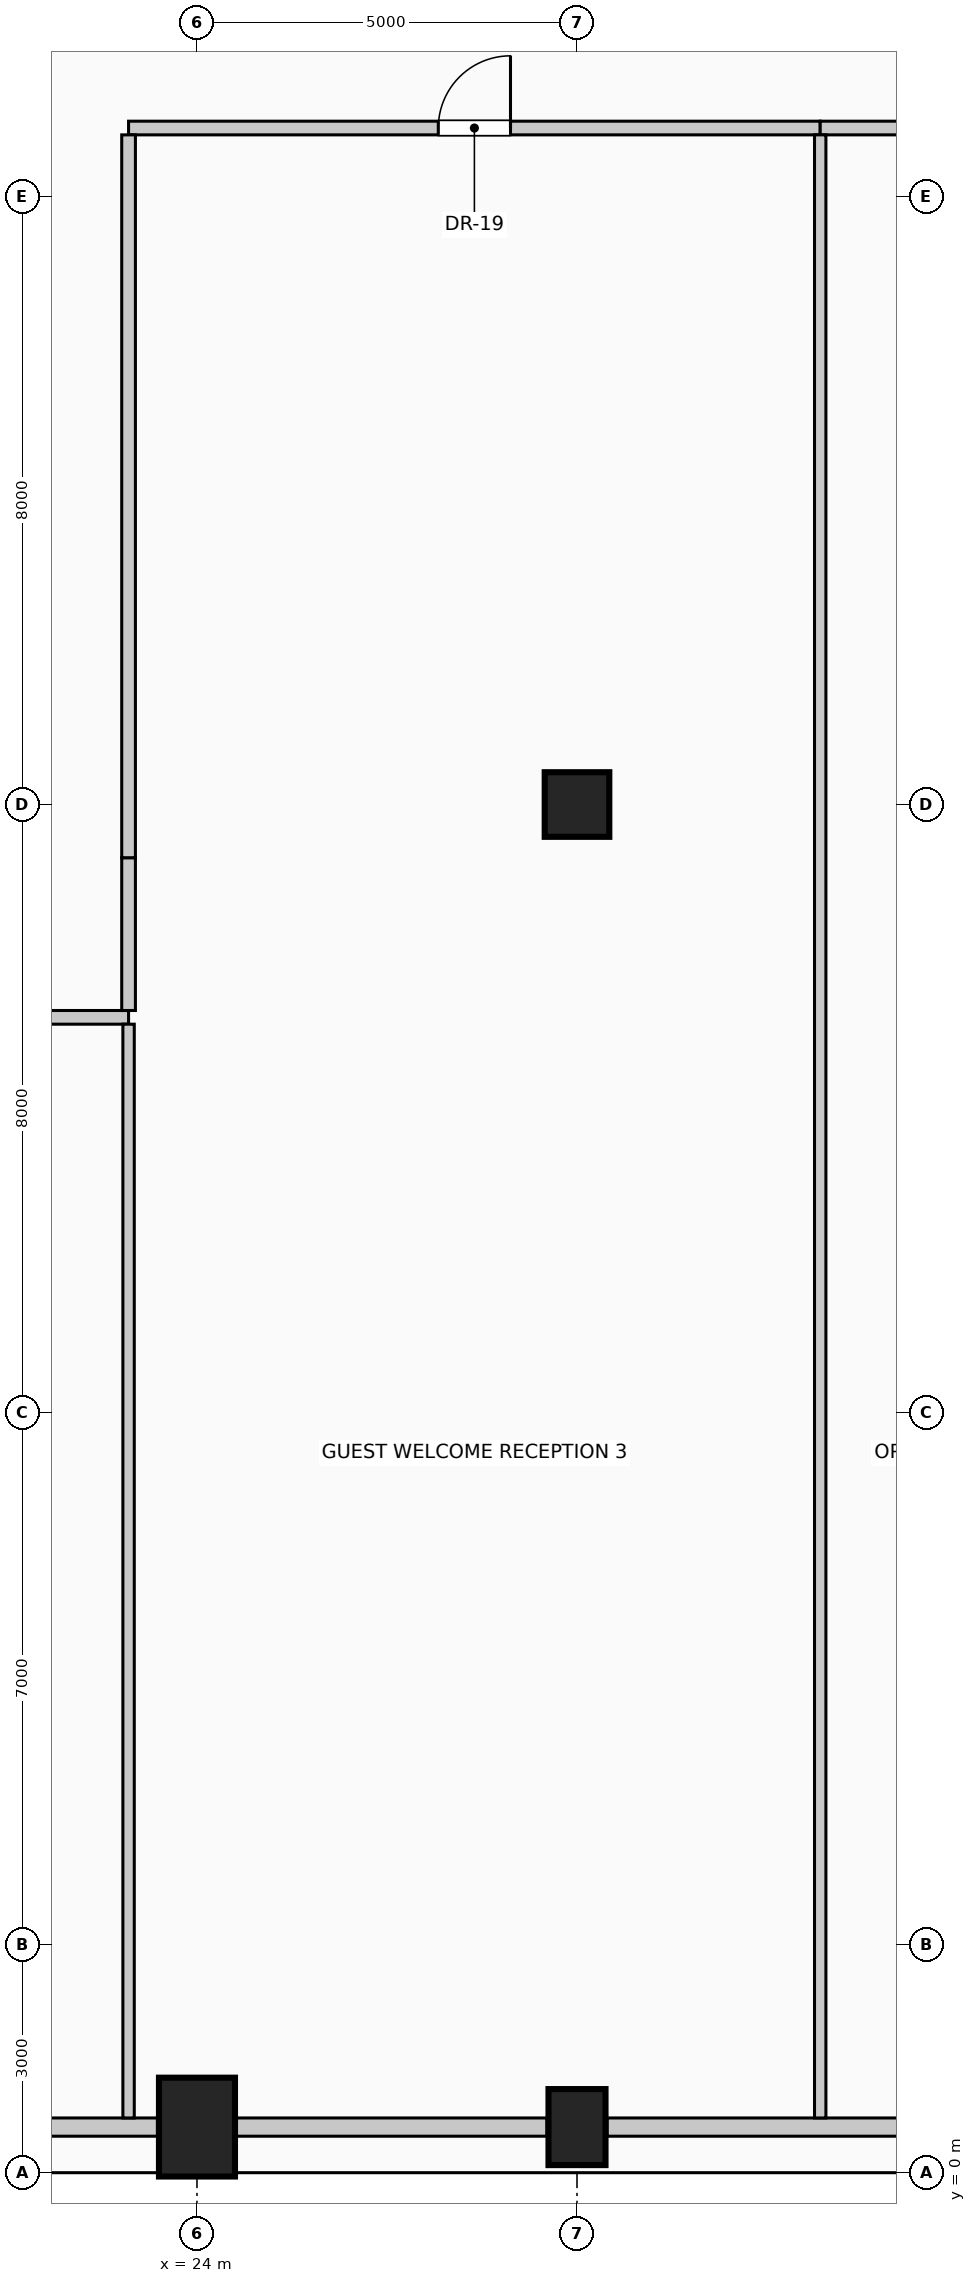
"""IFC4 building model, lengths in metres.
Left out: names, types, materials, properties, quantities, classifications, styles, units other than length and angle.
Written with IfcOpenShell. Run it as: python <this file> out.ifc"""

import sys

from ifc_helpers import new_model, si_unit, direction, frame, frame_2d, origin, origin_2d, place, context, subcontext, project, spatial, rectangle, circle, extrude, element, fill, save


model = new_model("IFC4")
c1 = context("Model", 3, precision=1e-05, world=origin(), true_north=direction((0.0, 1.0)))
c2 = subcontext(c1, "Body", "Model", "MODEL_VIEW")
j1 = project(units=[si_unit("LENGTHUNIT", "METRE"), si_unit("PLANEANGLEUNIT", "RADIAN")], contexts=[c1])
p1 = place(None, origin())
s1 = spatial("IfcSite", under=j1, at=p1, CompositionType="ELEMENT")
p2 = place(p1, origin())
s2 = spatial("IfcBuilding", under=s1, at=p2, CompositionType="ELEMENT")
p3 = place(p2, frame((0.0, 0.0, 222.6)))
s3 = spatial("IfcBuildingStorey", under=s2, at=p3, CompositionType="ELEMENT", Elevation=222.6)
p4 = place(p3, frame((24.0, 0.6, 0.0), z_axis=(0.0, 0.0, 1.0), x_axis=(1.0, 0.0, 0.0)))
e1 = element("IfcColumn", 1, at=p4, inside=s3, PredefinedType="COLUMN", context=c2, shape_type="SweptSolid", body=[
    extrude(rectangle(XDim=1.0, YDim=1.3, at=origin_2d()), origin(), (0.0, 0.0, 1.0), 4.0),
])
p5 = place(p3, frame((29.0, 0.6, 0.0), z_axis=(0.0, 0.0, 1.0), x_axis=(1.0, 0.0, 0.0)))
e2 = element("IfcColumn", 2, at=p5, inside=s3, PredefinedType="COLUMN", context=c2, shape_type="SweptSolid", body=[
    extrude(rectangle(XDim=0.75, YDim=1.0, at=origin_2d()), origin(), (0.0, 0.0, 1.0), 4.0),
])
p6 = place(p3, frame((29.0, 18.0, 0.0), z_axis=(0.0, 0.0, 1.0), x_axis=(1.0, 0.0, 0.0)))
e3 = element("IfcColumn", 3, at=p6, inside=s3, PredefinedType="COLUMN", context=c2, shape_type="SweptSolid", body=[
    extrude(circle(Radius=0.425, at=origin_2d()), origin(), (0.0, 0.0, 1.0), 4.0),
])
p7 = place(p3, frame((23.48, 0.6, 0.0), z_axis=(0.0, 0.0, 1.0), x_axis=(-1.0, 0.0, 0.0)))
e4 = element("IfcWall", 4, at=p7, inside=s3, PredefinedType="SOLIDWALL", context=c2, shape_type="SweptSolid", body=[
    extrude(rectangle(XDim=6.56, YDim=0.24, at=frame_2d((3.28, 0.0))), origin(), (0.0, 0.0, 1.0), 3.0),
])
p8 = place(p7, frame((3.773, 0.0, 0.42)))
e5 = element("IfcOpeningElement", 5, at=p8, cuts=e4, PredefinedType="OPENING", context=c2, shape_type="SweptSolid", body=[
    extrude(rectangle(XDim=1.8, YDim=2.2, at=frame_2d((0.9, 1.1))), frame((0.0, 0.13, 0.0), z_axis=(0.0, -1.0, 0.0), x_axis=(1.0, 0.0, 0.0)), (0.0, 0.0, 1.0), 0.26),
])
for number, where, z_axis, x_axis in (
    (6, (28.605, 0.6, 0.0), (0.0, 0.0, 1.0), (-1.0, 0.0, 0.0)),
    (7, (33.48, 0.6, 0.0), (0.0, 0.0, 1.0), (-1.0, 0.0, 0.0)),
):
    element("IfcWall", number, at=place(p3, frame(where, z_axis=z_axis, x_axis=x_axis)), inside=s3, PredefinedType="SOLIDWALL", context=c2, shape_type="SweptSolid", body=[
        extrude(rectangle(XDim=4.085, YDim=0.24, at=frame_2d((2.042, 0.0))), origin(), (0.0, 0.0, 1.0), 3.0),
    ])
p9 = place(p3, frame((8.5, 15.2, 0.0), z_axis=(0.0, 0.0, 1.0), x_axis=(1.0, 0.0, 0.0)))
e8 = element("IfcWall", 8, at=p9, inside=s3, PredefinedType="PARTITIONING", context=c2, shape_type="SweptSolid", body=[
    extrude(rectangle(XDim=14.6, YDim=0.18, at=frame_2d((7.3, 0.0))), origin(), (0.0, 0.0, 1.0), 3.75),
])
p10 = place(p9, frame((6.775, 0.0, 0.0)))
e9 = element("IfcOpeningElement", 9, at=p10, cuts=e8, PredefinedType="OPENING", context=c2, shape_type="SweptSolid", body=[
    extrude(rectangle(XDim=1.05, YDim=2.15, at=frame_2d((0.525, 1.075))), frame((0.0, 0.1, 0.0), z_axis=(0.0, -1.0, 0.0), x_axis=(1.0, 0.0, 0.0)), (0.0, 0.0, 1.0), 0.2),
])
p11 = place(p3, frame((23.1, 26.9, 0.0), z_axis=(0.0, 0.0, 1.0), x_axis=(1.0, 0.0, 0.0)))
e10 = element("IfcWall", 10, at=p11, inside=s3, PredefinedType="PARTITIONING", context=c2, shape_type="SweptSolid", body=[
    extrude(rectangle(XDim=9.1, YDim=0.18, at=frame_2d((4.55, 0.0))), origin(), (0.0, 0.0, 1.0), 3.75),
])
p12 = place(p11, frame((4.075, 0.0, 0.0)))
e11 = element("IfcOpeningElement", 11, at=p12, cuts=e10, PredefinedType="OPENING", context=c2, shape_type="SweptSolid", body=[
    extrude(rectangle(XDim=0.95, YDim=2.15, at=frame_2d((0.475, 1.075))), frame((0.0, 0.1, 0.0), z_axis=(0.0, -1.0, 0.0), x_axis=(1.0, 0.0, 0.0)), (0.0, 0.0, 1.0), 0.2),
])
p13 = place(p3, frame((32.2, 26.9, 0.0), z_axis=(0.0, 0.0, 1.0), x_axis=(1.0, 0.0, 0.0)))
e12 = element("IfcWall", 12, at=p13, inside=s3, PredefinedType="PARTITIONING", context=c2, shape_type="SweptSolid", body=[
    extrude(rectangle(XDim=5.7, YDim=0.18, at=frame_2d((2.85, 0.0))), origin(), (0.0, 0.0, 1.0), 3.75),
])
p14 = place(p13, frame((2.325, 0.0, 0.0)))
e13 = element("IfcOpeningElement", 13, at=p14, cuts=e12, PredefinedType="OPENING", context=c2, shape_type="SweptSolid", body=[
    extrude(rectangle(XDim=1.05, YDim=2.15, at=frame_2d((0.525, 1.075))), frame((0.0, 0.1, 0.0), z_axis=(0.0, -1.0, 0.0), x_axis=(1.0, 0.0, 0.0)), (0.0, 0.0, 1.0), 0.2),
])
p15 = place(p3, frame((23.1, 0.72, 0.0), z_axis=(0.0, 0.0, 1.0), x_axis=(0.0, 1.0, 0.0)))
e14 = element("IfcWall", 14, at=p15, inside=s3, PredefinedType="PARTITIONING", context=c2, shape_type="SweptSolid", body=[
    extrude(rectangle(XDim=14.39, YDim=0.15, at=frame_2d((7.195, 0.0))), origin(), (0.0, 0.0, 1.0), 3.75),
])
p16 = place(p3, frame((23.1, 15.29, 0.0), z_axis=(0.0, 0.0, 1.0), x_axis=(0.0, 1.0, 0.0)))
e15 = element("IfcWall", 15, at=p16, inside=s3, PredefinedType="PARTITIONING", context=c2, shape_type="SweptSolid", body=[
    extrude(rectangle(XDim=2.01, YDim=0.18, at=frame_2d((1.005, 0.0))), origin(), (0.0, 0.0, 1.0), 3.75),
])
p17 = place(p3, frame((23.1, 17.3, 0.0), z_axis=(0.0, 0.0, 1.0), x_axis=(0.0, 1.0, 0.0)))
e16 = element("IfcWall", 16, at=p17, inside=s3, PredefinedType="PARTITIONING", context=c2, shape_type="SweptSolid", body=[
    extrude(rectangle(XDim=9.51, YDim=0.18, at=frame_2d((4.755, 0.0))), origin(), (0.0, 0.0, 1.0), 3.75),
])
p18 = place(p3, frame((32.2, 0.72, 0.0), z_axis=(0.0, 0.0, 1.0), x_axis=(0.0, 1.0, 0.0)))
e17 = element("IfcWall", 17, at=p18, inside=s3, PredefinedType="PARTITIONING", context=c2, shape_type="SweptSolid", body=[
    extrude(rectangle(XDim=26.09, YDim=0.15, at=frame_2d((13.045, 0.0))), origin(), (0.0, 0.0, 1.0), 3.75),
])
p19 = place(p12, origin())
e18 = element("IfcDoor", 18, at=p19, inside=s3, OperationType="SINGLE_SWING_RIGHT", PredefinedType="DOOR", context=c2, shape_type="SweptSolid", body=[
    extrude(rectangle(XDim=0.95, YDim=2.15, at=frame_2d((0.475, 1.075))), frame((0.0, 0.025, 0.0), z_axis=(0.0, -1.0, 0.0), x_axis=(1.0, 0.0, 0.0)), (0.0, 0.0, 1.0), 0.05),
])
fill(e11, e18)
save(model, sys.argv[1])
